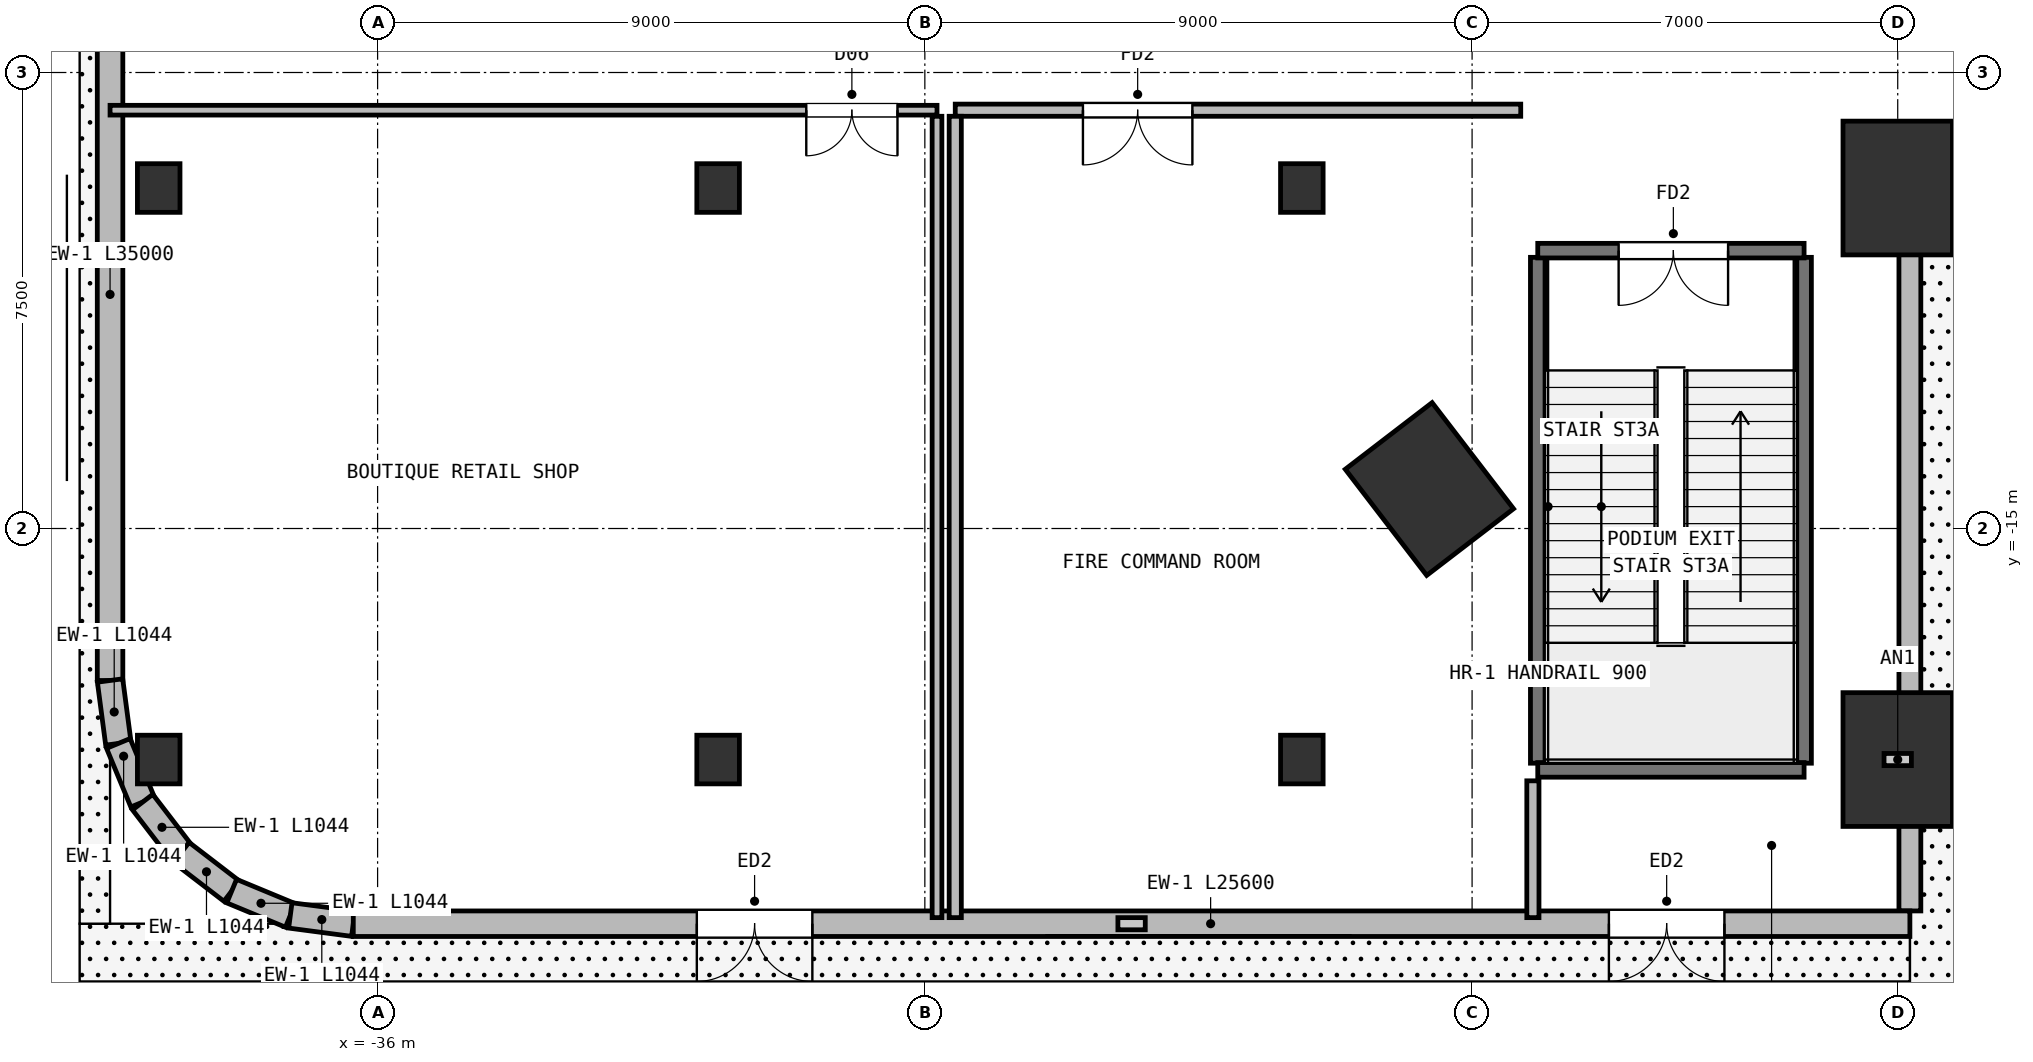
"""IFC4 building model, lengths in metres.
Left out: names, types, materials, properties, quantities, classifications, styles, units other than length and angle.
Written with IfcOpenShell. Run it as: python <this file> out.ifc"""

import sys

from ifc_helpers import new_model, si_unit, direction, frame, frame_2d, origin, origin_2d, place, context, subcontext, project, spatial, rectangle, extrude, element, fill, save


model = new_model("IFC4")
c1 = context("Model", 3, precision=1e-05, world=origin(), true_north=direction((0.0, 1.0)))
c2 = subcontext(c1, "Body", "Model", "MODEL_VIEW")
j1 = project(units=[si_unit("LENGTHUNIT", "METRE"), si_unit("PLANEANGLEUNIT", "RADIAN")], contexts=[c1])
p1 = place(None, origin())
s1 = spatial("IfcSite", under=j1, at=p1, CompositionType="ELEMENT")
p2 = place(p1, origin())
s2 = spatial("IfcBuilding", under=s1, at=p2, CompositionType="ELEMENT")
p3 = place(p2, origin())
s3 = spatial("IfcBuildingStorey", under=s2, at=p3, CompositionType="ELEMENT", Elevation=0.0)
p4 = place(p3, frame((-18.702, -14.351, 0.0), z_axis=(0.0, 0.0, 1.0), x_axis=(0.793353340291, 0.608761429009, 0.0)))
e1 = element("IfcColumn", 1, at=p4, inside=s3, PredefinedType="COLUMN", context=c2, shape_type="SweptSolid", body=[
    extrude(rectangle(XDim=1.8, YDim=2.2, at=origin_2d()), origin(), (0.0, 0.0, 1.0), 6.0),
])
for number, where, z_axis, x_axis in (
    (2, (-39.6, -18.8, 0.0), (0.0, 0.0, 1.0), (1.0, 0.0, 0.0)),
    (3, (-39.6, -9.4, 0.0), (0.0, 0.0, 1.0), (1.0, 0.0, 0.0)),
    (4, (-30.4, -18.8, 0.0), (0.0, 0.0, 1.0), (1.0, 0.0, 0.0)),
    (5, (-30.4, -9.4, 0.0), (0.0, 0.0, 1.0), (1.0, 0.0, 0.0)),
    (6, (-20.8, -18.8, 0.0), (0.0, 0.0, 1.0), (1.0, 0.0, 0.0)),
    (7, (-20.8, -9.4, 0.0), (0.0, 0.0, 1.0), (1.0, 0.0, 0.0)),
):
    element("IfcColumn", number, at=place(p3, frame(where, z_axis=z_axis, x_axis=x_axis)), inside=s3, PredefinedType="COLUMN", context=c2, shape_type="SweptSolid", body=[
        extrude(rectangle(XDim=0.7, YDim=0.8, at=origin_2d()), origin(), (0.0, 0.0, 1.0), 6.0),
    ])
for number, where, z_axis, x_axis in (
    (8, (-11.0, -18.8, 0.0), (0.0, 0.0, 1.0), (1.0, 0.0, 0.0)),
    (9, (-11.0, -9.4, 0.0), (0.0, 0.0, 1.0), (1.0, 0.0, 0.0)),
):
    element("IfcColumn", number, at=place(p3, frame(where, z_axis=z_axis, x_axis=x_axis)), inside=s3, PredefinedType="COLUMN", context=c2, shape_type="SweptSolid", body=[
        extrude(rectangle(XDim=1.8, YDim=2.2, at=origin_2d()), origin(), (0.0, 0.0, 1.0), 6.0),
    ])
p5 = place(p3, frame((-10.8, -21.29, 0.0), z_axis=(0.0, 0.0, 1.0), x_axis=(0.0, 1.0, 0.0)))
e10 = element("IfcWall", 10, at=p5, inside=s3, PredefinedType="SOLIDWALL", context=c2, shape_type="SweptSolid", body=[
    extrude(rectangle(XDim=10.97, YDim=0.36, at=frame_2d((5.485, 0.0))), origin(), (0.0, 0.0, 1.0), 5.1),
])
p6 = place(p3, frame((-40.4, -17.5, 0.0), z_axis=(0.0, 0.0, 1.0), x_axis=(0.0, 1.0, 0.0)))
e11 = element("IfcWall", 11, at=p6, inside=s3, PredefinedType="SOLIDWALL", context=c2, shape_type="SweptSolid", body=[
    extrude(rectangle(XDim=35.0, YDim=0.42, at=frame_2d((17.5, 0.0))), origin(), (0.0, 0.0, 1.0), 5.1),
])
p7 = place(p6, frame((12.7, 0.0, 0.0)))
e12 = element("IfcOpeningElement", 12, at=p7, cuts=e11, PredefinedType="OPENING", context=c2, shape_type="SweptSolid", body=[
    extrude(rectangle(XDim=2.4, YDim=2.65, at=frame_2d((1.2, 1.325))), frame((0.0, 0.22, 0.0), z_axis=(0.0, -1.0, 0.0), x_axis=(1.0, 0.0, 0.0)), (0.0, 0.0, 1.0), 0.44),
])
p8 = place(p6, frame((19.9, 0.0, 0.0)))
e13 = element("IfcOpeningElement", 13, at=p8, cuts=e11, PredefinedType="OPENING", context=c2, shape_type="SweptSolid", body=[
    extrude(rectangle(XDim=2.4, YDim=2.65, at=frame_2d((1.2, 1.325))), frame((0.0, 0.22, 0.0), z_axis=(0.0, -1.0, 0.0), x_axis=(1.0, 0.0, 0.0)), (0.0, 0.0, 1.0), 0.44),
])
p9 = place(p6, frame((30.35, 0.0, 0.0)))
e14 = element("IfcOpeningElement", 14, at=p9, cuts=e11, PredefinedType="OPENING", context=c2, shape_type="SweptSolid", body=[
    extrude(rectangle(XDim=4.2, YDim=3.2, at=frame_2d((2.1, 1.6))), frame((0.0, 0.22, 0.0), z_axis=(0.0, -1.0, 0.0), x_axis=(1.0, 0.0, 0.0)), (0.0, 0.0, 1.0), 0.44),
])
p10 = place(p3, frame((-40.264, -18.535, 0.0), z_axis=(0.0, 0.0, 1.0), x_axis=(-0.130448465198, 0.991455091231, 0.0)))
e15 = element("IfcWall", 15, at=p10, inside=s3, PredefinedType="SOLIDWALL", context=c2, shape_type="SweptSolid", body=[
    extrude(rectangle(XDim=1.044, YDim=0.42, at=frame_2d((0.522, 0.0))), origin(), (0.0, 0.0, 1.0), 5.72),
])
p11 = place(p3, frame((-39.864, -19.5, 0.0), z_axis=(0.0, 0.0, 1.0), x_axis=(-0.382771688877, 0.923842970528, 0.0)))
e16 = element("IfcWall", 16, at=p11, inside=s3, PredefinedType="SOLIDWALL", context=c2, shape_type="SweptSolid", body=[
    extrude(rectangle(XDim=1.044, YDim=0.42, at=frame_2d((0.522, 0.0))), origin(), (0.0, 0.0, 1.0), 5.72),
])
p12 = place(p3, frame((-39.229, -20.328, 0.0), z_axis=(0.0, 0.0, 1.0), x_axis=(-0.608681879412, 0.793414374508, 0.0)))
e17 = element("IfcWall", 17, at=p12, inside=s3, PredefinedType="SOLIDWALL", context=c2, shape_type="SweptSolid", body=[
    extrude(rectangle(XDim=1.044, YDim=0.42, at=frame_2d((0.522, 0.0))), origin(), (0.0, 0.0, 1.0), 5.72),
])
p13 = place(p3, frame((-38.4, -20.964, 0.0), z_axis=(0.0, 0.0, 1.0), x_axis=(-0.793388088797, 0.608716141198, 0.0)))
e18 = element("IfcWall", 18, at=p13, inside=s3, PredefinedType="SOLIDWALL", context=c2, shape_type="SweptSolid", body=[
    extrude(rectangle(XDim=1.044, YDim=0.42, at=frame_2d((0.522, 0.0))), origin(), (0.0, 0.0, 1.0), 5.72),
])
p14 = place(p3, frame((-37.435, -21.364, 0.0), z_axis=(0.0, 0.0, 1.0), x_axis=(-0.923842970528, 0.382771688877, 0.0)))
e19 = element("IfcWall", 19, at=p14, inside=s3, PredefinedType="SOLIDWALL", context=c2, shape_type="SweptSolid", body=[
    extrude(rectangle(XDim=1.044, YDim=0.42, at=frame_2d((0.522, 0.0))), origin(), (0.0, 0.0, 1.0), 5.72),
])
p15 = place(p3, frame((-36.4, -21.5, 0.0), z_axis=(0.0, 0.0, 1.0), x_axis=(-0.991455091231, 0.130448465198, 0.0)))
e20 = element("IfcWall", 20, at=p15, inside=s3, PredefinedType="SOLIDWALL", context=c2, shape_type="SweptSolid", body=[
    extrude(rectangle(XDim=1.044, YDim=0.42, at=frame_2d((0.522, 0.0))), origin(), (0.0, 0.0, 1.0), 5.72),
])
p16 = place(p3, frame((-10.8, -21.5, 0.0), z_axis=(0.0, 0.0, 1.0), x_axis=(-1.0, 0.0, 0.0)))
e21 = element("IfcWall", 21, at=p16, inside=s3, PredefinedType="SOLIDWALL", context=c2, shape_type="SweptSolid", body=[
    extrude(rectangle(XDim=25.6, YDim=0.42, at=frame_2d((12.8, 0.0))), origin(), (0.0, 0.0, 1.0), 5.72),
])
p17 = place(p16, frame((18.05, 0.0, 0.0)))
e22 = element("IfcOpeningElement", 22, at=p17, cuts=e21, PredefinedType="OPENING", context=c2, shape_type="SweptSolid", body=[
    extrude(rectangle(XDim=1.9, YDim=2.35, at=frame_2d((0.95, 1.175))), frame((0.0, 0.22, 0.0), z_axis=(0.0, -1.0, 0.0), x_axis=(1.0, 0.0, 0.0)), (0.0, 0.0, 1.0), 0.44),
])
p18 = place(p16, frame((3.05, 0.0, 0.0)))
e23 = element("IfcOpeningElement", 23, at=p18, cuts=e21, PredefinedType="OPENING", context=c2, shape_type="SweptSolid", body=[
    extrude(rectangle(XDim=1.9, YDim=2.35, at=frame_2d((0.95, 1.175))), frame((0.0, 0.22, 0.0), z_axis=(0.0, -1.0, 0.0), x_axis=(1.0, 0.0, 0.0)), (0.0, 0.0, 1.0), 0.44),
])
for number, where, z_axis, x_axis in (
    (24, (-16.92, -18.86, 0.0), (0.0, 0.0, 1.0), (0.0, 1.0, 0.0)),
    (25, (-12.54, -18.86, 0.0), (0.0, 0.0, 1.0), (0.0, 1.0, 0.0)),
):
    element("IfcWall", number, at=place(p3, frame(where, z_axis=z_axis, x_axis=x_axis)), inside=s3, PredefinedType="SHEAR", context=c2, shape_type="SweptSolid", body=[
        extrude(rectangle(XDim=8.32, YDim=0.24, at=frame_2d((4.16, 0.0))), origin(), (0.0, 0.0, 1.0), 5.72),
    ])
p19 = place(p3, frame((-16.92, -18.97, 0.0), z_axis=(0.0, 0.0, 1.0), x_axis=(1.0, 0.0, 0.0)))
e26 = element("IfcWall", 26, at=p19, inside=s3, PredefinedType="SHEAR", context=c2, shape_type="SweptSolid", body=[
    extrude(rectangle(XDim=4.38, YDim=0.24, at=frame_2d((2.19, 0.0))), origin(), (0.0, 0.0, 1.0), 5.72),
])
p20 = place(p3, frame((-12.54, -10.43, 0.0), z_axis=(0.0, 0.0, 1.0), x_axis=(-1.0, 0.0, 0.0)))
e27 = element("IfcWall", 27, at=p20, inside=s3, PredefinedType="SHEAR", context=c2, shape_type="SweptSolid", body=[
    extrude(rectangle(XDim=4.38, YDim=0.24, at=frame_2d((2.19, 0.0))), origin(), (0.0, 0.0, 1.0), 5.72),
])
p21 = place(p20, frame((1.25, 0.0, 0.0)))
e28 = element("IfcOpeningElement", 28, at=p21, cuts=e27, PredefinedType="OPENING", context=c2, shape_type="SweptSolid", body=[
    extrude(rectangle(XDim=1.8, YDim=2.2, at=frame_2d((0.9, 1.1))), frame((0.0, 0.13, 0.0), z_axis=(0.0, -1.0, 0.0), x_axis=(1.0, 0.0, 0.0)), (0.0, 0.0, 1.0), 0.26),
])
p22 = place(p3, frame((-17.2, -8.12, 0.0), z_axis=(0.0, 0.0, 1.0), x_axis=(-1.0, 0.0, 0.0)))
e29 = element("IfcWall", 29, at=p22, inside=s3, PredefinedType="PARTITIONING", context=c2, shape_type="SweptSolid", body=[
    extrude(rectangle(XDim=9.3, YDim=0.2, at=frame_2d((4.65, 0.0))), origin(), (0.0, 0.0, 1.0), 5.72),
])
p23 = place(p22, frame((5.4, 0.0, 0.0)))
e30 = element("IfcOpeningElement", 30, at=p23, cuts=e29, PredefinedType="OPENING", context=c2, shape_type="SweptSolid", body=[
    extrude(rectangle(XDim=1.8, YDim=2.2, at=frame_2d((0.9, 1.1))), frame((0.0, 0.11, 0.0), z_axis=(0.0, -1.0, 0.0), x_axis=(1.0, 0.0, 0.0)), (0.0, 0.0, 1.0), 0.22),
])
p24 = place(p3, frame((-26.5, -8.22, 0.0), z_axis=(0.0, 0.0, 1.0), x_axis=(0.0, -1.0, 0.0)))
e31 = element("IfcWall", 31, at=p24, inside=s3, PredefinedType="PARTITIONING", context=c2, shape_type="SweptSolid", body=[
    extrude(rectangle(XDim=13.18, YDim=0.2, at=frame_2d((6.59, 0.0))), origin(), (0.0, 0.0, 1.0), 5.72),
])
p25 = place(p3, frame((-26.8, -8.12, 0.0), z_axis=(0.0, 0.0, 1.0), x_axis=(-1.0, 0.0, 0.0)))
e32 = element("IfcWall", 32, at=p25, inside=s3, PredefinedType="PARTITIONING", context=c2, shape_type="SweptSolid", body=[
    extrude(rectangle(XDim=13.6, YDim=0.16, at=frame_2d((6.8, 0.0))), origin(), (0.0, 0.0, 1.0), 5.72),
])
p26 = place(p25, frame((0.65, 0.0, 0.0)))
e33 = element("IfcOpeningElement", 33, at=p26, cuts=e32, PredefinedType="OPENING", context=c2, shape_type="SweptSolid", body=[
    extrude(rectangle(XDim=1.5, YDim=2.2, at=frame_2d((0.75, 1.1))), frame((0.0, 0.09, 0.0), z_axis=(0.0, -1.0, 0.0), x_axis=(1.0, 0.0, 0.0)), (0.0, 0.0, 1.0), 0.18),
])
p27 = place(p3, frame((-26.8, -21.4, 0.0), z_axis=(0.0, 0.0, 1.0), x_axis=(0.0, 1.0, 0.0)))
e34 = element("IfcWall", 34, at=p27, inside=s3, PredefinedType="PARTITIONING", context=c2, shape_type="SweptSolid", body=[
    extrude(rectangle(XDim=13.18, YDim=0.16, at=frame_2d((6.59, 0.0))), origin(), (0.0, 0.0, 1.0), 5.72),
])
p28 = place(p3, frame((-17.0, -19.15, 0.0), z_axis=(0.0, 0.0, 1.0), x_axis=(0.0, -1.0, 0.0)))
e35 = element("IfcWall", 35, at=p28, inside=s3, PredefinedType="PARTITIONING", context=c2, shape_type="SweptSolid", body=[
    extrude(rectangle(XDim=2.25, YDim=0.2, at=frame_2d((1.125, 0.0))), origin(), (0.0, 0.0, 1.0), 5.72),
])
p29 = place(p17, origin())
e36 = element("IfcDoor", 36, at=p29, inside=s3, OperationType="DOUBLE_DOOR_SINGLE_SWING", PredefinedType="DOOR", context=c2, shape_type="SweptSolid", body=[
    extrude(rectangle(XDim=1.9, YDim=2.35, at=frame_2d((0.95, 1.175))), frame((0.0, 0.025, 0.0), z_axis=(0.0, -1.0, 0.0), x_axis=(1.0, 0.0, 0.0)), (0.0, 0.0, 1.0), 0.05),
])
fill(e22, e36)
p30 = place(p18, origin())
e37 = element("IfcDoor", 37, at=p30, inside=s3, OperationType="DOUBLE_DOOR_SINGLE_SWING", PredefinedType="DOOR", context=c2, shape_type="SweptSolid", body=[
    extrude(rectangle(XDim=1.9, YDim=2.35, at=frame_2d((0.95, 1.175))), frame((0.0, 0.025, 0.0), z_axis=(0.0, -1.0, 0.0), x_axis=(1.0, 0.0, 0.0)), (0.0, 0.0, 1.0), 0.05),
])
fill(e23, e37)
p31 = place(p21, origin())
e38 = element("IfcDoor", 38, at=p31, inside=s3, OperationType="DOUBLE_DOOR_SINGLE_SWING", PredefinedType="DOOR", context=c2, shape_type="SweptSolid", body=[
    extrude(rectangle(XDim=1.8, YDim=2.2, at=frame_2d((0.9, 1.1))), frame((0.0, 0.025, 0.0), z_axis=(0.0, -1.0, 0.0), x_axis=(1.0, 0.0, 0.0)), (0.0, 0.0, 1.0), 0.05),
])
fill(e28, e38)
p32 = place(p23, origin())
e39 = element("IfcDoor", 39, at=p32, inside=s3, OperationType="DOUBLE_DOOR_SINGLE_SWING", PredefinedType="DOOR", context=c2, shape_type="SweptSolid", body=[
    extrude(rectangle(XDim=1.8, YDim=2.2, at=frame_2d((0.9, 1.1))), frame((0.0, 0.025, 0.0), z_axis=(0.0, -1.0, 0.0), x_axis=(1.0, 0.0, 0.0)), (0.0, 0.0, 1.0), 0.05),
])
fill(e30, e39)
p33 = place(p26, origin())
e40 = element("IfcDoor", 40, at=p33, inside=s3, OperationType="DOUBLE_DOOR_SINGLE_SWING", PredefinedType="DOOR", context=c2, shape_type="SweptSolid", body=[
    extrude(rectangle(XDim=1.5, YDim=2.2, at=frame_2d((0.75, 1.1))), frame((0.0, 0.025, 0.0), z_axis=(0.0, -1.0, 0.0), x_axis=(1.0, 0.0, 0.0)), (0.0, 0.0, 1.0), 0.05),
])
fill(e33, e40)
save(model, sys.argv[1])
